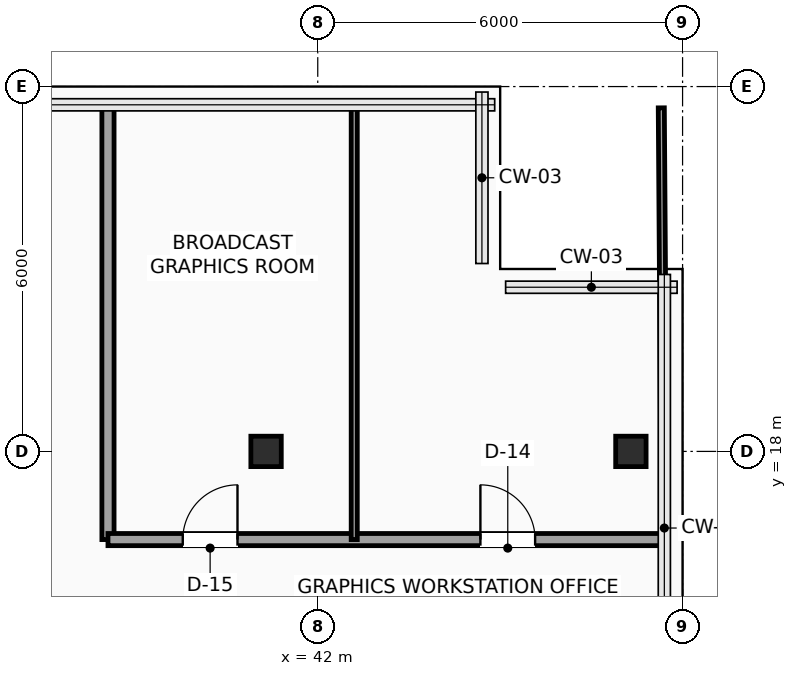
"""IFC4 building model, lengths in metres.
Left out: names, types, materials, properties, quantities, classifications, styles, units other than length and angle.
Written with IfcOpenShell. Run it as: python <this file> out.ifc"""

import sys

from ifc_helpers import new_model, si_unit, direction, frame, frame_2d, origin, origin_2d, place, context, subcontext, project, spatial, rectangle, hollow_rectangle, extrude, element, fill, save


model = new_model("IFC4")
c1 = context("Model", 3, precision=1e-05, world=origin(), true_north=direction((0.0, 1.0)))
c2 = subcontext(c1, "Body", "Model", "MODEL_VIEW")
j1 = project(units=[si_unit("LENGTHUNIT", "METRE"), si_unit("PLANEANGLEUNIT", "RADIAN")], contexts=[c1])
p1 = place(None, origin())
s1 = spatial("IfcSite", under=j1, at=p1, CompositionType="ELEMENT")
p2 = place(p1, origin())
s2 = spatial("IfcBuilding", under=s1, at=p2, CompositionType="ELEMENT")
p3 = place(p2, frame((0.0, 0.0, 138.15)))
s3 = spatial("IfcBuildingStorey", under=s2, at=p3, CompositionType="ELEMENT", Elevation=138.15)
for number, where, z_axis, x_axis in (
    (1, (41.15, 18.0, 0.0), (0.0, 0.0, 1.0), (1.0, 0.0, 0.0)),
    (2, (47.15, 18.0, 0.0), (0.0, 0.0, 1.0), (1.0, 0.0, 0.0)),
):
    element("IfcColumn", number, at=place(p3, frame(where, z_axis=z_axis, x_axis=x_axis)), inside=s3, PredefinedType="COLUMN", context=c2, shape_type="SweptSolid", body=[
        extrude(hollow_rectangle(XDim=0.5, YDim=0.5, WallThickness=0.025, InnerFilletRadius=0.025, OuterFilletRadius=0.04, at=origin_2d()), origin(), (0.0, 0.0, 1.0), 3.75),
    ])
p4 = place(p3, frame((38.55, 23.7, 0.0), z_axis=(0.0, 0.0, 1.0), x_axis=(0.0, -1.0, 0.0)))
e3 = element("IfcWall", 3, at=p4, inside=s3, PredefinedType="PARTITIONING", context=c2, shape_type="SweptSolid", body=[
    extrude(rectangle(XDim=7.15, YDim=0.2, at=frame_2d((3.575, 0.0))), origin(), (0.0, 0.0, 1.0), 3.525),
])
p5 = place(p3, frame((38.55, 16.55, 0.0), z_axis=(0.0, 0.0, 1.0), x_axis=(1.0, 0.0, 0.0)))
e4 = element("IfcWall", 4, at=p5, inside=s3, PredefinedType="PARTITIONING", context=c2, shape_type="SweptSolid", body=[
    extrude(rectangle(XDim=9.15, YDim=0.2, at=frame_2d((4.575, 0.0))), origin(), (0.0, 0.0, 1.0), 3.525),
])
p6 = place(p5, frame((1.23, 0.0, 0.0)))
e5 = element("IfcOpeningElement", 5, at=p6, cuts=e4, PredefinedType="OPENING", context=c2, shape_type="SweptSolid", body=[
    extrude(rectangle(XDim=0.9, YDim=2.1, at=frame_2d((0.45, 1.05))), frame((0.0, 0.11, 0.0), z_axis=(0.0, -1.0, 0.0), x_axis=(1.0, 0.0, 0.0)), (0.0, 0.0, 1.0), 0.22),
])
p7 = place(p5, frame((6.125, 0.0, 0.0)))
e6 = element("IfcOpeningElement", 6, at=p7, cuts=e4, PredefinedType="OPENING", context=c2, shape_type="SweptSolid", body=[
    extrude(rectangle(XDim=0.9, YDim=2.1, at=frame_2d((0.45, 1.05))), frame((0.0, 0.11, 0.0), z_axis=(0.0, -1.0, 0.0), x_axis=(1.0, 0.0, 0.0)), (0.0, 0.0, 1.0), 0.22),
])
p8 = place(p3, frame((42.6, 16.55, 0.0), z_axis=(0.0, 0.0, 1.0), x_axis=(0.0, 1.0, 0.0)))
e7 = element("IfcWall", 7, at=p8, inside=s3, PredefinedType="PARTITIONING", context=c2, shape_type="SweptSolid", body=[
    extrude(rectangle(XDim=7.15, YDim=0.1, at=frame_2d((3.575, 0.0))), origin(), (0.0, 0.0, 1.0), 3.525),
])
p9 = place(p3, frame((47.7, 16.55, 0.0), z_axis=(0.0, 0.0, 1.0), x_axis=(-0.007049101019, 0.999975154779, 0.0)))
e8 = element("IfcWall", 8, at=p9, inside=s3, PredefinedType="PARTITIONING", context=c2, shape_type="SweptSolid", body=[
    extrude(rectangle(XDim=7.1, YDim=0.1, at=frame_2d((3.55, 0.0))), origin(), (0.0, 0.0, 1.0), 3.525),
])
p10 = place(p6, origin())
e9 = element("IfcDoor", 9, at=p10, inside=s3, OperationType="SINGLE_SWING_RIGHT", PredefinedType="DOOR", context=c2, shape_type="SweptSolid", body=[
    extrude(rectangle(XDim=0.9, YDim=2.1, at=frame_2d((0.45, 1.05))), frame((0.0, 0.025, 0.0), z_axis=(0.0, -1.0, 0.0), x_axis=(1.0, 0.0, 0.0)), (0.0, 0.0, 1.0), 0.05),
])
fill(e5, e9)
p11 = place(p7, origin())
e10 = element("IfcDoor", 10, at=p11, inside=s3, OperationType="SINGLE_SWING_LEFT", PredefinedType="DOOR", context=c2, shape_type="SweptSolid", body=[
    extrude(rectangle(XDim=0.9, YDim=2.1, at=frame_2d((0.45, 1.05))), frame((0.0, 0.025, 0.0), z_axis=(0.0, -1.0, 0.0), x_axis=(1.0, 0.0, 0.0)), (0.0, 0.0, 1.0), 0.05),
])
fill(e6, e10)
save(model, sys.argv[1])
